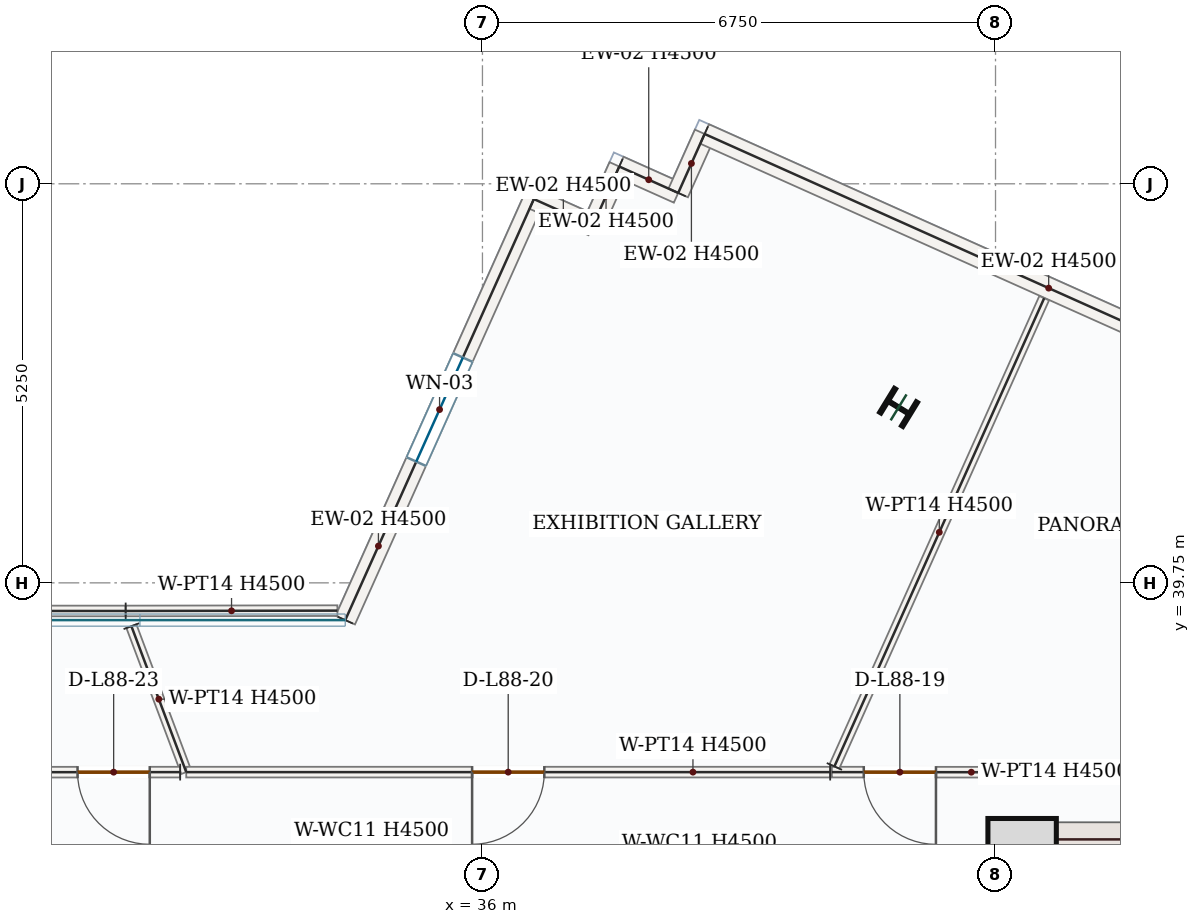
"""IFC4 building model, lengths in metres.
Left out: names, types, materials, properties, quantities, classifications, styles, units other than length and angle.
Written with IfcOpenShell. Run it as: python <this file> out.ifc"""

import sys

from ifc_helpers import new_model, si_unit, direction, frame, frame_2d, origin, origin_2d, place, context, subcontext, project, spatial, rectangle, i_section, extrude, source, transform, mapped, element, fill, save


model = new_model("IFC4")
c1 = context("Model", 3, precision=1e-05, world=origin(), true_north=direction((0.0, 1.0)))
c2 = subcontext(c1, "Body", "Model", "MODEL_VIEW")
j1 = project(units=[si_unit("LENGTHUNIT", "METRE"), si_unit("PLANEANGLEUNIT", "RADIAN")], contexts=[c1])
p1 = place(None, origin())
s1 = spatial("IfcSite", under=j1, at=p1, CompositionType="ELEMENT")
p2 = place(p1, origin())
s2 = spatial("IfcBuilding", under=s1, at=p2, CompositionType="ELEMENT")
p3 = place(p2, frame((0.0, 0.0, 361.05)))
s3 = spatial("IfcBuildingStorey", under=s2, at=p3, CompositionType="ELEMENT", Elevation=361.05)
p4 = place(p3, frame((42.975, 28.05, 0.0), z_axis=(0.0, 0.0, 1.0), x_axis=(0.0, 1.0, 0.0)))
e1 = element("IfcWall", 1, at=p4, inside=s3, PredefinedType="SHEAR", context=c2, shape_type="SweptSolid", body=[
    extrude(rectangle(XDim=8.55, YDim=0.45, at=frame_2d((4.275, 0.0))), origin(), (0.0, 0.0, 1.0), 4.5),
])
p5 = place(p4, frame((1.5, 0.0, 0.0)))
e2 = element("IfcOpeningElement", 2, at=p5, cuts=e1, PredefinedType="OPENING", context=c2, shape_type="SweptSolid", body=[
    extrude(rectangle(XDim=1.1, YDim=2.2, at=frame_2d((0.55, 1.1))), frame((0.0, 0.235, 0.0), z_axis=(0.0, -1.0, 0.0), x_axis=(1.0, 0.0, 0.0)), (0.0, 0.0, 1.0), 0.47),
])
m1 = source(origin(), c2, "Body", "SweptSolid", [
    extrude(rectangle(XDim=7.1, YDim=0.45, at=frame_2d((3.55, 0.0))), origin(), (0.0, 0.0, 1.0), 4.5),
])
p6 = place(p3, frame((43.2, 36.375, 0.0), z_axis=(0.0, 0.0, 1.0), x_axis=(1.0, 0.0, 0.0)))
e3 = element("IfcWall", 3, at=p6, inside=s3, PredefinedType="SHEAR", context=c2, shape_type="MappedRepresentation", body=[
    mapped(m1, transform((0.0, 0.0, 0.0), x_axis=(1.0, 0.0, 0.0), y_axis=(0.0, 1.0, 0.0), z_axis=(0.0, 0.0, 1.0), scale=1.0)),
])
m2 = source(origin(), c2, "Body", "SweptSolid", [
    extrude(rectangle(XDim=0.9, YDim=0.9, at=origin_2d()), origin(), (0.0, 0.0, 1.0), 4.8),
])
p7 = place(p3, frame((43.1, 36.2, 0.0), z_axis=(0.0, 0.0, 1.0), x_axis=(1.0, 0.0, 0.0)))
e4 = element("IfcColumn", 4, at=p7, inside=s3, PredefinedType="COLUMN", context=c2, shape_type="MappedRepresentation", body=[
    mapped(m2, transform((0.0, 0.0, 0.0), x_axis=(1.0, 0.0, 0.0), y_axis=(0.0, 1.0, 0.0), z_axis=(0.0, 0.0, 1.0), scale=1.0)),
])
m3 = source(origin(), c2, "Body", "SweptSolid", [
    extrude(i_section(OverallWidth=0.369, OverallDepth=0.356, WebThickness=0.011, FlangeThickness=0.018, FilletRadius=0.018, at=origin_2d()), origin(), (0.0, 0.0, 1.0), 4.8),
])
p8 = place(p3, frame((41.475, 42.058, 0.0), z_axis=(0.0, 0.0, 1.0), x_axis=(0.522498564716, 0.852640164354, 0.0)))
e5 = element("IfcColumn", 5, at=p8, inside=s3, PredefinedType="COLUMN", context=c2, shape_type="MappedRepresentation", body=[
    mapped(m3, transform((0.0, 0.0, 0.0), x_axis=(1.0, 0.0, 0.0), y_axis=(0.0, 1.0, 0.0), z_axis=(0.0, 0.0, 1.0), scale=1.0)),
])
p9 = place(p3, frame((34.195, 39.26, 0.0), z_axis=(0.0, 0.0, 1.0), x_axis=(0.408872261421, 0.912591624901, 0.0)))
e6 = element("IfcWall", 6, at=p9, inside=s3, PredefinedType="SOLIDWALL", context=c2, shape_type="SweptSolid", body=[
    extrude(rectangle(XDim=6.07, YDim=0.28, at=frame_2d((3.035, 0.0))), origin(), (0.0, 0.0, 1.0), 4.5),
])
p10 = place(p9, frame((2.285, 0.0, 0.85)))
e7 = element("IfcOpeningElement", 7, at=p10, cuts=e6, PredefinedType="OPENING", context=c2, shape_type="SweptSolid", body=[
    extrude(rectangle(XDim=1.5, YDim=1.5, at=frame_2d((0.75, 0.75))), frame((0.0, 0.15, 0.0), z_axis=(0.0, -1.0, 0.0), x_axis=(1.0, 0.0, 0.0)), (0.0, 0.0, 1.0), 0.3),
])
m4 = source(origin(), c2, "Body", "SweptSolid", [
    extrude(rectangle(XDim=0.85, YDim=0.28, at=frame_2d((0.425, 0.0))), origin(), (0.0, 0.0, 1.0), 4.5),
])
p11 = place(p3, frame((36.677, 44.799, 0.0), z_axis=(0.0, 0.0, 1.0), x_axis=(0.912634994598, -0.408775447691, 0.0)))
e8 = element("IfcWall", 8, at=p11, inside=s3, PredefinedType="SOLIDWALL", context=c2, shape_type="MappedRepresentation", body=[
    mapped(m4, transform((0.0, 0.0, 0.0), x_axis=(1.0, 0.0, 0.0), y_axis=(0.0, 1.0, 0.0), z_axis=(0.0, 0.0, 1.0), scale=1.0)),
])
m5 = source(origin(), c2, "Body", "SweptSolid", [
    extrude(rectangle(XDim=0.85, YDim=0.28, at=frame_2d((0.425, 0.0))), origin(), (0.0, 0.0, 1.0), 4.5),
])
p12 = place(p3, frame((37.452, 44.452, 0.0), z_axis=(0.0, 0.0, 1.0), x_axis=(0.409014667771, 0.912527808644, 0.0)))
e9 = element("IfcWall", 9, at=p12, inside=s3, PredefinedType="SOLIDWALL", context=c2, shape_type="MappedRepresentation", body=[
    mapped(m5, transform((0.0, 0.0, 0.0), x_axis=(1.0, 0.0, 0.0), y_axis=(0.0, 1.0, 0.0), z_axis=(0.0, 0.0, 1.0), scale=1.0)),
])
for number, where, z_axis, x_axis in (
    (10, (37.8, 45.227, 0.0), (0.0, 0.0, 1.0), (0.913, -0.409, 0.0)),
    (11, (38.575, 44.88, 0.0), (0.0, 0.0, 1.0), (0.409, 0.913, 0.0)),
):
    element("IfcWall", number, at=place(p3, frame(where, z_axis=z_axis, x_axis=x_axis)), inside=s3, PredefinedType="SOLIDWALL", context=c2, shape_type="MappedRepresentation", body=[
        mapped(m4, transform((0.0, 0.0, 0.0), x_axis=(1.0, 0.0, 0.0), y_axis=(0.0, 1.0, 0.0), z_axis=(0.0, 0.0, 1.0), scale=1.0)),
    ])
m6 = source(origin(), c2, "Body", "SweptSolid", [
    extrude(rectangle(XDim=9.92, YDim=0.28, at=frame_2d((4.96, 0.0))), origin(), (0.0, 0.0, 1.0), 4.5),
])
p13 = place(p3, frame((38.923, 45.656, 0.0), z_axis=(0.0, 0.0, 1.0), x_axis=(0.91259673328, -0.408860859469, 0.0)))
e12 = element("IfcWall", 12, at=p13, inside=s3, PredefinedType="SOLIDWALL", context=c2, shape_type="MappedRepresentation", body=[
    mapped(m6, transform((0.0, 0.0, 0.0), x_axis=(1.0, 0.0, 0.0), y_axis=(0.0, 1.0, 0.0), z_axis=(0.0, 0.0, 1.0), scale=1.0)),
])
m7 = source(origin(), c2, "Body", "SweptSolid", [
    extrude(rectangle(XDim=2.051, YDim=0.14, at=frame_2d((1.025, 0.0))), origin(), (0.0, 0.0, 1.0), 4.5),
])
p14 = place(p3, frame((31.382, 39.18, 0.0), z_axis=(0.0, 0.0, 1.0), x_axis=(0.35174952174, -0.936094158702, 0.0)))
e13 = element("IfcWall", 13, at=p14, inside=s3, PredefinedType="PARTITIONING", context=c2, shape_type="MappedRepresentation", body=[
    mapped(m7, transform((0.0, 0.0, 0.0), x_axis=(1.0, 0.0, 0.0), y_axis=(0.0, 1.0, 0.0), z_axis=(0.0, 0.0, 1.0), scale=1.0)),
])
p15 = place(p3, frame((32.023, 37.26, 0.0), z_axis=(0.0, 0.0, 1.0), x_axis=(-0.999999902762, -0.000440994842, 0.0)))
e14 = element("IfcWall", 14, at=p15, inside=s3, PredefinedType="PARTITIONING", context=c2, shape_type="SweptSolid", body=[
    extrude(rectangle(XDim=2.768, YDim=0.14, at=frame_2d((1.384, 0.0))), origin(), (0.0, 0.0, 1.0), 4.5),
])
p16 = place(p15, frame((0.4, 0.0, 0.0)))
e15 = element("IfcOpeningElement", 15, at=p16, cuts=e14, PredefinedType="OPENING", context=c2, shape_type="SweptSolid", body=[
    extrude(rectangle(XDim=0.95, YDim=2.15, at=frame_2d((0.475, 1.075))), frame((0.0, 0.08, 0.0), z_axis=(0.0, -1.0, 0.0), x_axis=(1.0, 0.0, 0.0)), (0.0, 0.0, 1.0), 0.16),
])
m8 = source(origin(), c2, "Body", "SweptSolid", [
    extrude(rectangle(XDim=6.234, YDim=0.14, at=frame_2d((3.117, 0.0))), origin(), (0.0, 0.0, 1.0), 4.5),
])
p17 = place(p3, frame((25.073, 39.38, 0.0), z_axis=(0.0, 0.0, 1.0), x_axis=(0.999999996932, -7.8330004e-05, 0.0)))
e16 = element("IfcWall", 16, at=p17, inside=s3, PredefinedType="PARTITIONING", context=c2, shape_type="MappedRepresentation", body=[
    mapped(m8, transform((0.0, 0.0, 0.0), x_axis=(1.0, 0.0, 0.0), y_axis=(0.0, 1.0, 0.0), z_axis=(0.0, 0.0, 1.0), scale=1.0)),
])
p18 = place(p3, frame((42.747, 37.259, 0.0), z_axis=(0.0, 0.0, 1.0), x_axis=(-0.999999838805, 0.000567794594, 0.0)))
e17 = element("IfcWall", 17, at=p18, inside=s3, PredefinedType="PARTITIONING", context=c2, shape_type="SweptSolid", body=[
    extrude(rectangle(XDim=2.15, YDim=0.14, at=frame_2d((1.075, 0.0))), origin(), (0.0, 0.0, 1.0), 4.5),
])
p19 = place(p18, frame((0.78, 0.0, 0.0)))
e18 = element("IfcOpeningElement", 18, at=p19, cuts=e17, PredefinedType="OPENING", context=c2, shape_type="SweptSolid", body=[
    extrude(rectangle(XDim=0.95, YDim=2.15, at=frame_2d((0.475, 1.075))), frame((0.0, 0.08, 0.0), z_axis=(0.0, -1.0, 0.0), x_axis=(1.0, 0.0, 0.0)), (0.0, 0.0, 1.0), 0.16),
])
m9 = source(origin(), c2, "Body", "SweptSolid", [
    extrude(rectangle(XDim=6.75, YDim=0.14, at=frame_2d((3.375, 0.0))), origin(), (0.0, 0.0, 1.0), 4.5),
])
p20 = place(p3, frame((40.63, 37.335, 0.0), z_axis=(0.0, 0.0, 1.0), x_axis=(0.408861688893, 0.912596361682, 0.0)))
e19 = element("IfcWall", 19, at=p20, inside=s3, PredefinedType="PARTITIONING", context=c2, shape_type="MappedRepresentation", body=[
    mapped(m9, transform((0.0, 0.0, 0.0), x_axis=(1.0, 0.0, 0.0), y_axis=(0.0, 1.0, 0.0), z_axis=(0.0, 0.0, 1.0), scale=1.0)),
])
p21 = place(p3, frame((40.575, 37.26, 0.0), z_axis=(0.0, 0.0, 1.0), x_axis=(-1.0, 0.0, 0.0)))
e20 = element("IfcWall", 20, at=p21, inside=s3, PredefinedType="PARTITIONING", context=c2, shape_type="SweptSolid", body=[
    extrude(rectangle(XDim=8.472, YDim=0.14, at=frame_2d((4.236, 0.0))), origin(), (0.0, 0.0, 1.0), 4.5),
])
p22 = place(p21, frame((3.761, 0.0, 0.0)))
e21 = element("IfcOpeningElement", 21, at=p22, cuts=e20, PredefinedType="OPENING", context=c2, shape_type="SweptSolid", body=[
    extrude(rectangle(XDim=0.95, YDim=2.15, at=frame_2d((0.475, 1.075))), frame((0.0, 0.08, 0.0), z_axis=(0.0, -1.0, 0.0), x_axis=(1.0, 0.0, 0.0)), (0.0, 0.0, 1.0), 0.16),
])
m10 = source(origin(), c2, "Body", "SweptSolid", [
    extrude(rectangle(XDim=2.785, YDim=0.14, at=frame_2d((1.393, 0.0))), origin(), (0.0, 0.0, 1.0), 4.5),
])
p23 = place(p3, frame((31.306, 39.38, 0.0), z_axis=(0.0, 0.0, 1.0), x_axis=(0.999998755431, 0.001577699851, 0.0)))
e22 = element("IfcWall", 22, at=p23, inside=s3, PredefinedType="PARTITIONING", context=c2, shape_type="MappedRepresentation", body=[
    mapped(m10, transform((0.0, 0.0, 0.0), x_axis=(1.0, 0.0, 0.0), y_axis=(0.0, 1.0, 0.0), z_axis=(0.0, 0.0, 1.0), scale=1.0)),
])
m11 = source(origin(), c2, "Body", "SweptSolid", [
    extrude(rectangle(XDim=1.5, YDim=1.5, at=frame_2d((0.75, 0.75))), frame((0.0, 0.03, 0.0), z_axis=(0.0, -1.0, 0.0), x_axis=(1.0, 0.0, 0.0)), (0.0, 0.0, 1.0), 0.06),
])
p24 = place(p10, origin())
e23 = element("IfcWindow", 23, at=p24, inside=s3, PartitioningType="SINGLE_PANEL", PredefinedType="WINDOW", context=c2, shape_type="MappedRepresentation", body=[
    mapped(m11, transform((0.0, 0.0, 0.0), x_axis=(1.0, 0.0, 0.0), y_axis=(0.0, 1.0, 0.0), z_axis=(0.0, 0.0, 1.0), scale=1.0)),
])
fill(e7, e23)
m12 = source(origin(), c2, "Body", "SweptSolid", [
    extrude(rectangle(XDim=0.95, YDim=2.15, at=frame_2d((0.475, 1.075))), frame((0.0, 0.025, 0.0), z_axis=(0.0, -1.0, 0.0), x_axis=(1.0, 0.0, 0.0)), (0.0, 0.0, 1.0), 0.05),
])
p25 = place(p19, origin())
e24 = element("IfcDoor", 24, at=p25, inside=s3, OperationType="SINGLE_SWING_LEFT", PredefinedType="DOOR", context=c2, shape_type="MappedRepresentation", body=[
    mapped(m12, transform((0.0, 0.0, 0.0), x_axis=(1.0, 0.0, 0.0), y_axis=(0.0, 1.0, 0.0), z_axis=(0.0, 0.0, 1.0), scale=1.0)),
])
fill(e18, e24)
p26 = place(p22, origin())
e25 = element("IfcDoor", 25, at=p26, inside=s3, OperationType="SINGLE_SWING_RIGHT", PredefinedType="DOOR", context=c2, shape_type="MappedRepresentation", body=[
    mapped(m12, transform((0.0, 0.0, 0.0), x_axis=(1.0, 0.0, 0.0), y_axis=(0.0, 1.0, 0.0), z_axis=(0.0, 0.0, 1.0), scale=1.0)),
])
fill(e21, e25)
p27 = place(p16, origin())
e26 = element("IfcDoor", 26, at=p27, inside=s3, OperationType="SINGLE_SWING_LEFT", PredefinedType="DOOR", context=c2, shape_type="MappedRepresentation", body=[
    mapped(m12, transform((0.0, 0.0, 0.0), x_axis=(1.0, 0.0, 0.0), y_axis=(0.0, 1.0, 0.0), z_axis=(0.0, 0.0, 1.0), scale=1.0)),
])
fill(e15, e26)
save(model, sys.argv[1])
